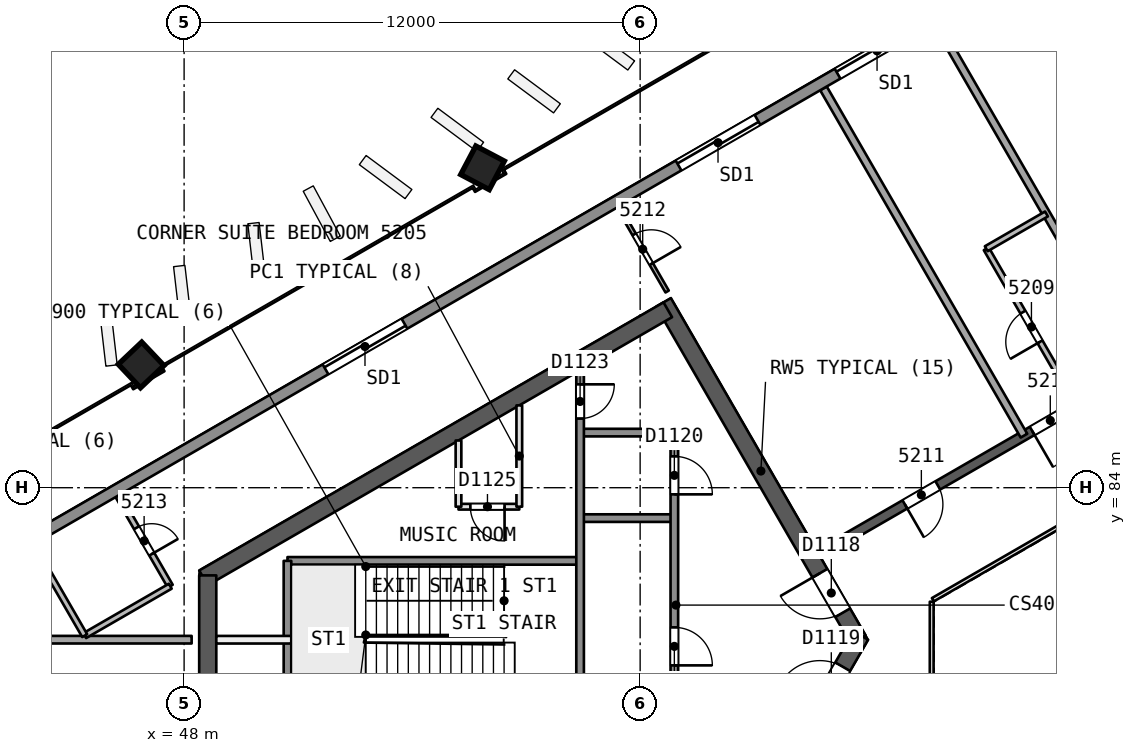
"""IFC4 building model, lengths in metres.
Left out: names, types, materials, properties, quantities, classifications, styles, units other than length and angle.
Written with IfcOpenShell. Run it as: python <this file> out.ifc"""

import sys

from ifc_helpers import new_model, si_unit, direction, frame, frame_2d, origin, origin_2d, place, context, subcontext, project, spatial, rectangle, extrude, element, fill, save


model = new_model("IFC4")
c1 = context("Model", 3, precision=1e-05, world=origin(), true_north=direction((0.0, 1.0)))
c2 = subcontext(c1, "Body", "Model", "MODEL_VIEW")
j1 = project(units=[si_unit("LENGTHUNIT", "METRE"), si_unit("PLANEANGLEUNIT", "RADIAN")], contexts=[c1])
p1 = place(None, origin())
s1 = spatial("IfcSite", under=j1, at=p1, CompositionType="ELEMENT")
p2 = place(p1, origin())
s2 = spatial("IfcBuilding", under=s1, at=p2, CompositionType="ELEMENT")
p3 = place(p2, frame((0.0, 0.0, 213.2)))
s3 = spatial("IfcBuildingStorey", under=s2, at=p3, CompositionType="ELEMENT", Elevation=213.2)
p4 = place(p3, frame((65.74, 80.0, 0.0), z_axis=(0.0, 0.0, 1.0), x_axis=(-0.499991857942, 0.866030104553, 0.0)))
e1 = element("IfcWall", 1, at=p4, inside=s3, PredefinedType="SHEAR", context=c2, shape_type="SweptSolid", body=[
    extrude(rectangle(XDim=10.25, YDim=0.45, at=frame_2d((5.125, 0.0))), origin(), (0.0, 0.0, 1.0), 3.7),
])
p5 = place(p4, frame((0.82, 0.0, 0.0)))
e2 = element("IfcOpeningElement", 2, at=p5, cuts=e1, PredefinedType="OPENING", context=c2, shape_type="SweptSolid", body=[
    extrude(rectangle(XDim=1.2, YDim=2.1, at=frame_2d((0.6, 1.05))), frame((0.0, 0.235, 0.0), z_axis=(0.0, -1.0, 0.0), x_axis=(1.0, 0.0, 0.0)), (0.0, 0.0, 1.0), 0.471),
])
p6 = place(p3, frame((60.728, 88.682, 0.0), z_axis=(0.0, 0.0, 1.0), x_axis=(-0.866021613849, -0.500006564303, 0.0)))
e3 = element("IfcWall", 3, at=p6, inside=s3, PredefinedType="SHEAR", context=c2, shape_type="SweptSolid", body=[
    extrude(rectangle(XDim=14.108, YDim=0.45, at=frame_2d((7.054, 0.0))), origin(), (0.0, 0.0, 1.0), 3.7),
])
p7 = place(p3, frame((48.622, 81.693, 0.0), z_axis=(0.0, 0.0, 1.0), x_axis=(0.0, -1.0, 0.0)))
e4 = element("IfcWall", 4, at=p7, inside=s3, PredefinedType="SHEAR", context=c2, shape_type="SweptSolid", body=[
    extrude(rectangle(XDim=3.515, YDim=0.45, at=frame_2d((1.758, 0.0))), origin(), (0.0, 0.0, 1.0), 3.7),
])
p8 = place(p3, frame((60.728, 71.318, 0.0), z_axis=(0.0, 0.0, 1.0), x_axis=(0.500012416173, 0.866018235185, 0.0)))
e5 = element("IfcWall", 5, at=p8, inside=s3, PredefinedType="SHEAR", context=c2, shape_type="SweptSolid", body=[
    extrude(rectangle(XDim=10.155, YDim=0.45, at=frame_2d((5.078, 0.0))), origin(), (0.0, 0.0, 1.0), 3.7),
])
p9 = place(p8, frame((8.005, 0.0, 0.0)))
e6 = element("IfcOpeningElement", 6, at=p9, cuts=e5, PredefinedType="OPENING", context=c2, shape_type="SweptSolid", body=[
    extrude(rectangle(XDim=1.2, YDim=2.1, at=frame_2d((0.6, 1.05))), frame((0.0, 0.235, 0.0), z_axis=(0.0, -1.0, 0.0), x_axis=(1.0, 0.0, 0.0)), (0.0, 0.0, 1.0), 0.471),
])
p10 = place(p3, frame((78.2, 90.046, 0.0), z_axis=(0.0, 0.0, 1.0), x_axis=(-0.866026492143, -0.499998114903, 0.0)))
e7 = element("IfcWall", 7, at=p10, inside=s3, PredefinedType="SHEAR", context=c2, shape_type="SweptSolid", body=[
    extrude(rectangle(XDim=15.588, YDim=0.25, at=frame_2d((7.794, 0.0))), origin(), (0.0, 0.0, 1.0), 3.3),
])
p11 = place(p10, frame((2.462, 0.0, 0.0)))
e8 = element("IfcOpeningElement", 8, at=p11, cuts=e7, PredefinedType="OPENING", context=c2, shape_type="SweptSolid", body=[
    extrude(rectangle(XDim=1.0, YDim=2.1, at=frame_2d((0.5, 1.05))), frame((0.0, 0.135, 0.0), z_axis=(0.0, -1.0, 0.0), x_axis=(1.0, 0.0, 0.0)), (0.0, 0.0, 1.0), 0.271),
])
p12 = place(p10, frame((8.003, 0.0, 0.0)))
e9 = element("IfcOpeningElement", 9, at=p12, cuts=e7, PredefinedType="OPENING", context=c2, shape_type="SweptSolid", body=[
    extrude(rectangle(XDim=1.1, YDim=2.1, at=frame_2d((0.55, 1.05))), frame((0.0, 0.135, 0.0), z_axis=(0.0, -1.0, 0.0), x_axis=(1.0, 0.0, 0.0)), (0.0, 0.0, 1.0), 0.271),
])
p13 = place(p10, frame((11.971, 0.0, 0.0)))
e10 = element("IfcOpeningElement", 10, at=p13, cuts=e7, PredefinedType="OPENING", context=c2, shape_type="SweptSolid", body=[
    extrude(rectangle(XDim=1.0, YDim=2.1, at=frame_2d((0.5, 1.05))), frame((0.0, 0.135, 0.0), z_axis=(0.0, -1.0, 0.0), x_axis=(1.0, 0.0, 0.0)), (0.0, 0.0, 1.0), 0.271),
])
p14 = place(p3, frame((55.83, 92.432, 0.0), z_axis=(0.019328516974, -0.012138044789, 0.999739504221), x_axis=(-0.500205614953, 0.865671455024, 0.020181048691)))
e11 = element("IfcColumn", 11, at=p14, inside=s3, PredefinedType="COLUMN", context=c2, shape_type="SweptSolid", body=[
    extrude(rectangle(XDim=0.85, YDim=0.85, at=origin_2d()), origin(), (0.0, 0.0, 1.0), 3.701),
])
p15 = place(p3, frame((46.835, 87.239, 0.0), z_axis=(0.02855911485, -0.006793507689, 0.999569019734), x_axis=(-0.500407643461, 0.865554709988, 0.020180049142)))
e12 = element("IfcColumn", 12, at=p15, inside=s3, PredefinedType="COLUMN", context=c2, shape_type="SweptSolid", body=[
    extrude(rectangle(XDim=0.85, YDim=0.85, at=origin_2d()), origin(), (0.0, 0.0, 1.0), 3.702),
])
p16 = place(p3, frame((67.794, 96.223, 0.0), z_axis=(0.0, 0.0, 1.0), x_axis=(0.500010840071, -0.866019145176, 0.0)))
e13 = element("IfcWall", 13, at=p16, inside=s3, PredefinedType="PARTITIONING", context=c2, shape_type="SweptSolid", body=[
    extrude(rectangle(XDim=10.552, YDim=0.2, at=frame_2d((5.276, 0.0))), origin(), (0.0, 0.0, 1.0), 3.3),
])
p17 = place(p3, frame((71.486, 86.169, 0.0), z_axis=(0.0, 0.0, 1.0), x_axis=(-0.499987613552, 0.866032554986, 0.0)))
e14 = element("IfcWall", 14, at=p17, inside=s3, PredefinedType="PARTITIONING", context=c2, shape_type="SweptSolid", body=[
    extrude(rectangle(XDim=4.755, YDim=0.15, at=frame_2d((2.378, 0.0))), origin(), (0.0, 0.0, 1.0), 3.3),
])
p18 = place(p17, frame((1.928, 0.0, 0.0)))
e15 = element("IfcOpeningElement", 15, at=p18, cuts=e14, PredefinedType="OPENING", context=c2, shape_type="SweptSolid", body=[
    extrude(rectangle(XDim=0.9, YDim=2.1, at=frame_2d((0.45, 1.05))), frame((0.0, 0.085, 0.0), z_axis=(0.0, -1.0, 0.0), x_axis=(1.0, 0.0, 0.0)), (0.0, 0.0, 1.0), 0.171),
])
p19 = place(p3, frame((69.108, 90.288, 0.0), z_axis=(0.0, 0.0, 1.0), x_axis=(0.866050016054, 0.499957367875, 0.0)))
e16 = element("IfcWall", 16, at=p19, inside=s3, PredefinedType="PARTITIONING", context=c2, shape_type="SweptSolid", body=[
    extrude(rectangle(XDim=1.829, YDim=0.15, at=frame_2d((0.915, 0.0))), origin(), (0.0, 0.0, 1.0), 3.3),
])
p20 = place(p3, frame((64.824, 94.508, 0.0), z_axis=(0.0, 0.0, 1.0), x_axis=(0.500010840071, -0.866019145176, 0.0)))
e17 = element("IfcWall", 17, at=p20, inside=s3, PredefinedType="PARTITIONING", context=c2, shape_type="SweptSolid", body=[
    extrude(rectangle(XDim=10.552, YDim=0.2, at=frame_2d((5.276, 0.0))), origin(), (0.0, 0.0, 1.0), 3.3),
])
p21 = place(p3, frame((59.424, 91.39, 0.0), z_axis=(0.0, 0.0, 1.0), x_axis=(0.49995513091, -0.866051307416, 0.0)))
e18 = element("IfcWall", 18, at=p21, inside=s3, PredefinedType="PARTITIONING", context=c2, shape_type="SweptSolid", body=[
    extrude(rectangle(XDim=2.573, YDim=0.1, at=frame_2d((1.287, 0.0))), origin(), (0.0, 0.0, 1.0), 3.3),
])
p22 = place(p21, frame((0.837, 0.0, 0.0)))
e19 = element("IfcOpeningElement", 19, at=p22, cuts=e18, PredefinedType="OPENING", context=c2, shape_type="SweptSolid", body=[
    extrude(rectangle(XDim=0.9, YDim=2.1, at=frame_2d((0.45, 1.05))), frame((0.0, 0.061, 0.0), z_axis=(0.0, -1.0, 0.0), x_axis=(1.0, 0.0, 0.0)), (0.0, 0.0, 1.0), 0.121),
])
p23 = place(p3, frame((46.26, 83.79, 0.0), z_axis=(0.0, 0.0, 1.0), x_axis=(0.500014382217, -0.866017100048, 0.0)))
e20 = element("IfcWall", 20, at=p23, inside=s3, PredefinedType="PARTITIONING", context=c2, shape_type="SweptSolid", body=[
    extrude(rectangle(XDim=2.751, YDim=0.15, at=frame_2d((1.375, 0.0))), origin(), (0.0, 0.0, 1.0), 3.3),
])
p24 = place(p23, frame((0.975, 0.0, 0.0)))
e21 = element("IfcOpeningElement", 21, at=p24, cuts=e20, PredefinedType="OPENING", context=c2, shape_type="SweptSolid", body=[
    extrude(rectangle(XDim=0.8, YDim=2.1, at=frame_2d((0.4, 1.05))), frame((0.0, 0.085, 0.0), z_axis=(0.0, -1.0, 0.0), x_axis=(1.0, 0.0, 0.0)), (0.0, 0.0, 1.0), 0.171),
])
p25 = place(p3, frame((47.636, 81.408, 0.0), z_axis=(0.0, 0.0, 1.0), x_axis=(-0.866021400173, -0.500006934395, 0.0)))
e22 = element("IfcWall", 22, at=p25, inside=s3, PredefinedType="PARTITIONING", context=c2, shape_type="SweptSolid", body=[
    extrude(rectangle(XDim=2.6, YDim=0.15, at=frame_2d((1.3, 0.0))), origin(), (0.0, 0.0, 1.0), 3.3),
])
p26 = place(p3, frame((45.384, 80.108, 0.0), z_axis=(0.0, 0.0, 1.0), x_axis=(-0.499949632511, 0.866054481515, 0.0)))
e23 = element("IfcWall", 23, at=p26, inside=s3, PredefinedType="PARTITIONING", context=c2, shape_type="SweptSolid", body=[
    extrude(rectangle(XDim=2.605, YDim=0.15, at=frame_2d((1.302, 0.0))), origin(), (0.0, 0.0, 1.0), 3.3),
])
p27 = place(p3, frame((44.082, 80.001, 0.0), z_axis=(0.0, 0.0, 1.0), x_axis=(1.0, 0.0, 0.0)))
e24 = element("IfcWall", 24, at=p27, inside=s3, PredefinedType="PARTITIONING", context=c2, shape_type="SweptSolid", body=[
    extrude(rectangle(XDim=4.116, YDim=0.2, at=frame_2d((2.058, 0.0))), origin(), (0.0, 0.0, 1.0), 3.3),
])
p28 = place(p3, frame((43.933, 82.619, 0.0), z_axis=(0.0, 0.0, 1.0), x_axis=(0.866026349667, 0.49999836168, 0.0)))
e25 = element("IfcWall", 25, at=p28, inside=s3, PredefinedType="SOLIDWALL", context=c2, shape_type="SweptSolid", body=[
    extrude(rectangle(XDim=51.192, YDim=0.3, at=frame_2d((25.596, 0.0))), origin(), (0.0, 0.0, 1.0), 3.3),
])
p29 = place(p28, frame((24.552, 0.0, 0.0)))
e26 = element("IfcOpeningElement", 26, at=p29, cuts=e25, PredefinedType="OPENING", context=c2, shape_type="SweptSolid", body=[
    extrude(rectangle(XDim=2.4, YDim=2.4, at=frame_2d((1.2, 1.2))), frame((0.0, 0.161, 0.0), z_axis=(0.0, -1.0, 0.0), x_axis=(1.0, 0.0, 0.0)), (0.0, 0.0, 1.0), 0.321),
])
p30 = place(p28, frame((29.228, 0.0, 0.0)))
e27 = element("IfcOpeningElement", 27, at=p30, cuts=e25, PredefinedType="OPENING", context=c2, shape_type="SweptSolid", body=[
    extrude(rectangle(XDim=2.4, YDim=2.4, at=frame_2d((1.2, 1.2))), frame((0.0, 0.161, 0.0), z_axis=(0.0, -1.0, 0.0), x_axis=(1.0, 0.0, 0.0)), (0.0, 0.0, 1.0), 0.321),
])
p31 = place(p28, frame((39.819, 0.0, 0.0)))
e28 = element("IfcOpeningElement", 28, at=p31, cuts=e25, PredefinedType="OPENING", context=c2, shape_type="SweptSolid", body=[
    extrude(rectangle(XDim=2.4, YDim=2.4, at=frame_2d((1.2, 1.2))), frame((0.0, 0.161, 0.0), z_axis=(0.0, -1.0, 0.0), x_axis=(1.0, 0.0, 0.0)), (0.0, 0.0, 1.0), 0.321),
])
p32 = place(p28, frame((19.719, 0.0, 0.0)))
e29 = element("IfcOpeningElement", 29, at=p32, cuts=e25, PredefinedType="OPENING", context=c2, shape_type="SweptSolid", body=[
    extrude(rectangle(XDim=2.4, YDim=2.4, at=frame_2d((1.2, 1.2))), frame((0.0, 0.161, 0.0), z_axis=(0.0, -1.0, 0.0), x_axis=(1.0, 0.0, 0.0)), (0.0, 0.0, 1.0), 0.321),
])
p33 = place(p28, frame((8.993, 0.0, 0.0)))
e30 = element("IfcOpeningElement", 30, at=p33, cuts=e25, PredefinedType="OPENING", context=c2, shape_type="SweptSolid", body=[
    extrude(rectangle(XDim=2.4, YDim=2.4, at=frame_2d((1.2, 1.2))), frame((0.0, 0.161, 0.0), z_axis=(0.0, -1.0, 0.0), x_axis=(1.0, 0.0, 0.0)), (0.0, 0.0, 1.0), 0.321),
])
p34 = place(p3, frame((60.9, 85.45, 0.0), z_axis=(0.0, 0.0, 1.0), x_axis=(-1.0, 0.0, 0.0)))
e31 = element("IfcWall", 31, at=p34, inside=s3, PredefinedType="SOLIDWALL", context=c2, shape_type="SweptSolid", body=[
    extrude(rectangle(XDim=2.48, YDim=0.2, at=frame_2d((1.24, 0.0))), origin(), (0.0, 0.0, 1.0), 3.3),
])
p35 = place(p3, frame((56.82, 83.5, 0.0), z_axis=(0.0, 0.0, 1.0), x_axis=(-1.0, 0.0, 0.0)))
e32 = element("IfcWall", 32, at=p35, inside=s3, PredefinedType="PARTITIONING", context=c2, shape_type="SweptSolid", body=[
    extrude(rectangle(XDim=1.6, YDim=0.15, at=frame_2d((0.8, 0.0))), origin(), (0.0, 0.0, 1.0), 3.3),
])
p36 = place(p35, frame((0.387, 0.0, 0.0)))
e33 = element("IfcOpeningElement", 33, at=p36, cuts=e32, PredefinedType="OPENING", context=c2, shape_type="SweptSolid", body=[
    extrude(rectangle(XDim=0.9, YDim=2.1, at=frame_2d((0.45, 1.05))), frame((0.0, 0.085, 0.0), z_axis=(0.0, -1.0, 0.0), x_axis=(1.0, 0.0, 0.0)), (0.0, 0.0, 1.0), 0.171),
])
p37 = place(p3, frame((60.9, 83.2, 0.0), z_axis=(0.0, 0.0, 1.0), x_axis=(-1.0, 0.0, 0.0)))
e34 = element("IfcWall", 34, at=p37, inside=s3, PredefinedType="SOLIDWALL", context=c2, shape_type="SweptSolid", body=[
    extrude(rectangle(XDim=2.48, YDim=0.2, at=frame_2d((1.24, 0.0))), origin(), (0.0, 0.0, 1.0), 3.3),
])
p38 = place(p3, frame((58.42, 82.075, 0.0), z_axis=(0.0, 0.0, 1.0), x_axis=(-1.0, 0.0, 0.0)))
e35 = element("IfcWall", 35, at=p38, inside=s3, PredefinedType="SOLIDWALL", context=c2, shape_type="SweptSolid", body=[
    extrude(rectangle(XDim=7.7, YDim=0.2, at=frame_2d((3.85, 0.0))), origin(), (0.0, 0.0, 1.0), 3.3),
])
p39 = place(p3, frame((50.82, 80.0, 0.0), z_axis=(0.0, 0.0, 1.0), x_axis=(-1.0, 0.0, 0.0)))
e36 = element("IfcWall", 36, at=p39, inside=s3, PredefinedType="PARTITIONING", context=c2, shape_type="SweptSolid", body=[
    extrude(rectangle(XDim=1.973, YDim=0.2, at=frame_2d((0.987, 0.0))), origin(), (0.0, 0.0, 1.0), 3.3),
])
p40 = place(p3, frame((60.9, 85.45, 0.0), z_axis=(0.0, 0.0, 1.0), x_axis=(0.0, -1.0, 0.0)))
e37 = element("IfcWall", 37, at=p40, inside=s3, PredefinedType="SOLIDWALL", context=c2, shape_type="SweptSolid", body=[
    extrude(rectangle(XDim=10.9, YDim=0.2, at=frame_2d((5.45, 0.0))), origin(), (0.0, 0.0, 1.0), 3.3),
])
p41 = place(p40, frame((0.625, 0.0, 0.0)))
e38 = element("IfcOpeningElement", 38, at=p41, cuts=e37, PredefinedType="OPENING", context=c2, shape_type="SweptSolid", body=[
    extrude(rectangle(XDim=1.0, YDim=2.1, at=frame_2d((0.5, 1.05))), frame((0.0, 0.11, 0.0), z_axis=(0.0, -1.0, 0.0), x_axis=(1.0, 0.0, 0.0)), (0.0, 0.0, 1.0), 0.221),
])
p42 = place(p40, frame((5.125, 0.0, 0.0)))
e39 = element("IfcOpeningElement", 39, at=p42, cuts=e37, PredefinedType="OPENING", context=c2, shape_type="SweptSolid", body=[
    extrude(rectangle(XDim=1.0, YDim=2.1, at=frame_2d((0.5, 1.05))), frame((0.0, 0.11, 0.0), z_axis=(0.0, -1.0, 0.0), x_axis=(1.0, 0.0, 0.0)), (0.0, 0.0, 1.0), 0.221),
])
p43 = place(p3, frame((58.42, 87.09, 0.0), z_axis=(0.0, 0.0, 1.0), x_axis=(0.0, -1.0, 0.0)))
e40 = element("IfcWall", 40, at=p43, inside=s3, PredefinedType="SOLIDWALL", context=c2, shape_type="SweptSolid", body=[
    extrude(rectangle(XDim=10.64, YDim=0.2, at=frame_2d((5.32, 0.0))), origin(), (0.0, 0.0, 1.0), 3.3),
])
p44 = place(p43, frame((0.37, 0.0, 0.0)))
e41 = element("IfcOpeningElement", 41, at=p44, cuts=e40, PredefinedType="OPENING", context=c2, shape_type="SweptSolid", body=[
    extrude(rectangle(XDim=0.9, YDim=2.1, at=frame_2d((0.45, 1.05))), frame((0.0, 0.11, 0.0), z_axis=(0.0, -1.0, 0.0), x_axis=(1.0, 0.0, 0.0)), (0.0, 0.0, 1.0), 0.221),
])
p45 = place(p3, frame((56.82, 86.166, 0.0), z_axis=(0.0, 0.0, 1.0), x_axis=(0.0, -1.0, 0.0)))
e42 = element("IfcWall", 42, at=p45, inside=s3, PredefinedType="PARTITIONING", context=c2, shape_type="SweptSolid", body=[
    extrude(rectangle(XDim=2.666, YDim=0.15, at=frame_2d((1.333, 0.0))), origin(), (0.0, 0.0, 1.0), 3.3),
])
p46 = place(p3, frame((55.22, 85.242, 0.0), z_axis=(0.0, 0.0, 1.0), x_axis=(0.0, -1.0, 0.0)))
e43 = element("IfcWall", 43, at=p46, inside=s3, PredefinedType="PARTITIONING", context=c2, shape_type="SweptSolid", body=[
    extrude(rectangle(XDim=1.742, YDim=0.15, at=frame_2d((0.871, 0.0))), origin(), (0.0, 0.0, 1.0), 3.3),
])
p47 = place(p3, frame((50.72, 82.075, 0.0), z_axis=(0.0, 0.0, 1.0), x_axis=(0.0, -1.0, 0.0)))
e44 = element("IfcWall", 44, at=p47, inside=s3, PredefinedType="SOLIDWALL", context=c2, shape_type="SweptSolid", body=[
    extrude(rectangle(XDim=4.15, YDim=0.2, at=frame_2d((2.075, 0.0))), origin(), (0.0, 0.0, 1.0), 3.3),
])
p48 = place(p3, frame((77.738, 86.846, 0.0), z_axis=(0.0, 0.0, 1.0), x_axis=(-0.866026658274, -0.499997827154, 0.0)))
e45 = element("IfcWall", 45, at=p48, inside=s3, PredefinedType="PARTITIONING", context=c2, shape_type="SweptSolid", body=[
    extrude(rectangle(XDim=11.588, YDim=0.1, at=frame_2d((5.794, 0.0))), origin(), (0.0, 0.0, 1.0), 3.3),
])
p49 = place(p3, frame((67.672, 81.0, 0.0), z_axis=(0.0, 0.0, 1.0), x_axis=(0.0, -1.0, 0.0)))
e46 = element("IfcWall", 46, at=p49, inside=s3, PredefinedType="PARTITIONING", context=c2, shape_type="SweptSolid", body=[
    extrude(rectangle(XDim=2.0, YDim=0.1, at=frame_2d((1.0, 0.0))), origin(), (0.0, 0.0, 1.0), 3.3),
])
p50 = place(p18, origin())
e47 = element("IfcDoor", 47, at=p50, inside=s3, OperationType="SINGLE_SWING_LEFT", PredefinedType="NOTDEFINED", context=c2, shape_type="SweptSolid", body=[
    extrude(rectangle(XDim=0.9, YDim=2.1, at=frame_2d((0.45, 1.05))), frame((0.0, 0.025, 0.0), z_axis=(0.0, -1.0, 0.0), x_axis=(1.0, 0.0, 0.0)), (0.0, 0.0, 1.0), 0.05),
])
fill(e15, e47)
p51 = place(p12, origin())
e48 = element("IfcDoor", 48, at=p51, inside=s3, OperationType="SINGLE_SWING_RIGHT", PredefinedType="NOTDEFINED", context=c2, shape_type="SweptSolid", body=[
    extrude(rectangle(XDim=1.1, YDim=2.1, at=frame_2d((0.55, 1.05))), frame((0.0, 0.025, 0.0), z_axis=(0.0, -1.0, 0.0), x_axis=(1.0, 0.0, 0.0)), (0.0, 0.0, 1.0), 0.05),
])
fill(e9, e48)
p52 = place(p13, origin())
e49 = element("IfcDoor", 49, at=p52, inside=s3, OperationType="SINGLE_SWING_RIGHT", PredefinedType="NOTDEFINED", context=c2, shape_type="SweptSolid", body=[
    extrude(rectangle(XDim=1.0, YDim=2.1, at=frame_2d((0.5, 1.05))), frame((0.0, 0.025, 0.0), z_axis=(0.0, -1.0, 0.0), x_axis=(1.0, 0.0, 0.0)), (0.0, 0.0, 1.0), 0.05),
])
fill(e10, e49)
p53 = place(p22, origin())
e50 = element("IfcDoor", 50, at=p53, inside=s3, OperationType="SINGLE_SWING_RIGHT", PredefinedType="NOTDEFINED", context=c2, shape_type="SweptSolid", body=[
    extrude(rectangle(XDim=0.9, YDim=2.1, at=frame_2d((0.45, 1.05))), frame((0.0, 0.025, 0.0), z_axis=(0.0, -1.0, 0.0), x_axis=(1.0, 0.0, 0.0)), (0.0, 0.0, 1.0), 0.05),
])
fill(e19, e50)
p54 = place(p24, origin())
e51 = element("IfcDoor", 51, at=p54, inside=s3, OperationType="SINGLE_SWING_RIGHT", PredefinedType="NOTDEFINED", context=c2, shape_type="SweptSolid", body=[
    extrude(rectangle(XDim=0.8, YDim=2.1, at=frame_2d((0.4, 1.05))), frame((0.0, 0.025, 0.0), z_axis=(0.0, -1.0, 0.0), x_axis=(1.0, 0.0, 0.0)), (0.0, 0.0, 1.0), 0.05),
])
fill(e21, e51)
p55 = place(p29, origin())
e52 = element("IfcDoor", 52, at=p55, inside=s3, OperationType="SLIDING_TO_LEFT", PredefinedType="NOTDEFINED", context=c2, shape_type="SweptSolid", body=[
    extrude(rectangle(XDim=2.4, YDim=2.4, at=frame_2d((1.2, 1.2))), frame((0.0, 0.025, 0.0), z_axis=(0.0, -1.0, 0.0), x_axis=(1.0, 0.0, 0.0)), (0.0, 0.0, 1.0), 0.05),
])
fill(e26, e52)
p56 = place(p32, origin())
e53 = element("IfcDoor", 53, at=p56, inside=s3, OperationType="SLIDING_TO_RIGHT", PredefinedType="NOTDEFINED", context=c2, shape_type="SweptSolid", body=[
    extrude(rectangle(XDim=2.4, YDim=2.4, at=frame_2d((1.2, 1.2))), frame((0.0, 0.025, 0.0), z_axis=(0.0, -1.0, 0.0), x_axis=(1.0, 0.0, 0.0)), (0.0, 0.0, 1.0), 0.05),
])
fill(e29, e53)
p57 = place(p33, origin())
e54 = element("IfcDoor", 54, at=p57, inside=s3, OperationType="SLIDING_TO_LEFT", PredefinedType="NOTDEFINED", context=c2, shape_type="SweptSolid", body=[
    extrude(rectangle(XDim=2.4, YDim=2.4, at=frame_2d((1.2, 1.2))), frame((0.0, 0.025, 0.0), z_axis=(0.0, -1.0, 0.0), x_axis=(1.0, 0.0, 0.0)), (0.0, 0.0, 1.0), 0.05),
])
fill(e30, e54)
p58 = place(p5, origin())
e55 = element("IfcDoor", 55, at=p58, inside=s3, OperationType="SINGLE_SWING_RIGHT", PredefinedType="NOTDEFINED", context=c2, shape_type="SweptSolid", body=[
    extrude(rectangle(XDim=1.2, YDim=2.1, at=frame_2d((0.6, 1.05))), frame((0.0, 0.025, 0.0), z_axis=(0.0, -1.0, 0.0), x_axis=(1.0, 0.0, 0.0)), (0.0, 0.0, 1.0), 0.05),
])
fill(e2, e55)
p59 = place(p9, origin())
e56 = element("IfcDoor", 56, at=p59, inside=s3, OperationType="SINGLE_SWING_LEFT", PredefinedType="NOTDEFINED", context=c2, shape_type="SweptSolid", body=[
    extrude(rectangle(XDim=1.2, YDim=2.1, at=frame_2d((0.6, 1.05))), frame((0.0, 0.025, 0.0), z_axis=(0.0, -1.0, 0.0), x_axis=(1.0, 0.0, 0.0)), (0.0, 0.0, 1.0), 0.05),
])
fill(e6, e56)
p60 = place(p41, origin())
e57 = element("IfcDoor", 57, at=p60, inside=s3, OperationType="SINGLE_SWING_RIGHT", PredefinedType="NOTDEFINED", context=c2, shape_type="SweptSolid", body=[
    extrude(rectangle(XDim=1.0, YDim=2.1, at=frame_2d((0.5, 1.05))), frame((0.0, 0.025, 0.0), z_axis=(0.0, -1.0, 0.0), x_axis=(1.0, 0.0, 0.0)), (0.0, 0.0, 1.0), 0.05),
])
fill(e38, e57)
p61 = place(p42, origin())
e58 = element("IfcDoor", 58, at=p61, inside=s3, OperationType="SINGLE_SWING_RIGHT", PredefinedType="NOTDEFINED", context=c2, shape_type="SweptSolid", body=[
    extrude(rectangle(XDim=1.0, YDim=2.1, at=frame_2d((0.5, 1.05))), frame((0.0, 0.025, 0.0), z_axis=(0.0, -1.0, 0.0), x_axis=(1.0, 0.0, 0.0)), (0.0, 0.0, 1.0), 0.05),
])
fill(e39, e58)
p62 = place(p44, origin())
e59 = element("IfcDoor", 59, at=p62, inside=s3, OperationType="SINGLE_SWING_LEFT", PredefinedType="NOTDEFINED", context=c2, shape_type="SweptSolid", body=[
    extrude(rectangle(XDim=0.9, YDim=2.1, at=frame_2d((0.45, 1.05))), frame((0.0, 0.025, 0.0), z_axis=(0.0, -1.0, 0.0), x_axis=(1.0, 0.0, 0.0)), (0.0, 0.0, 1.0), 0.05),
])
fill(e41, e59)
p63 = place(p36, origin())
e60 = element("IfcDoor", 60, at=p63, inside=s3, OperationType="SINGLE_SWING_LEFT", PredefinedType="NOTDEFINED", context=c2, shape_type="SweptSolid", body=[
    extrude(rectangle(XDim=0.9, YDim=2.1, at=frame_2d((0.45, 1.05))), frame((0.0, 0.025, 0.0), z_axis=(0.0, -1.0, 0.0), x_axis=(1.0, 0.0, 0.0)), (0.0, 0.0, 1.0), 0.05),
])
fill(e33, e60)
save(model, sys.argv[1])
